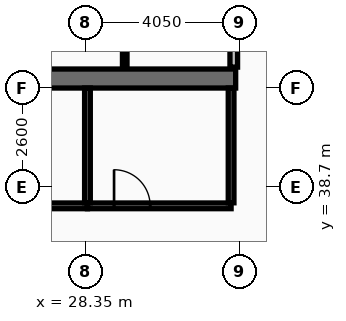
"""IFC4 building model, lengths in metres.
Left out: names, types, materials, properties, quantities, classifications, styles, units other than length and angle.
Written with IfcOpenShell. Run it as: python <this file> out.ifc"""

import sys

from ifc_helpers import new_model, si_unit, direction, frame, frame_2d, origin, place, context, subcontext, project, spatial, rectangle, extrude, element, fill, save


model = new_model("IFC4")
c1 = context("Model", 3, precision=1e-05, world=origin(), true_north=direction((0.0, 1.0)))
c2 = subcontext(c1, "Body", "Model", "MODEL_VIEW")
j1 = project(units=[si_unit("LENGTHUNIT", "METRE"), si_unit("PLANEANGLEUNIT", "RADIAN")], contexts=[c1])
p1 = place(None, origin())
s1 = spatial("IfcSite", under=j1, at=p1, CompositionType="ELEMENT")
p2 = place(p1, origin())
s2 = spatial("IfcBuilding", under=s1, at=p2, CompositionType="ELEMENT")
p3 = place(p2, frame((0.0, 0.0, 314.6)))
s3 = spatial("IfcBuildingStorey", under=s2, at=p3, CompositionType="ELEMENT", Elevation=314.6)
p4 = place(p3, frame((32.3, 41.55, 0.0), z_axis=(0.0, 0.0, 1.0), x_axis=(-1.0, 0.0, 0.0)))
e1 = element("IfcWall", 1, at=p4, inside=s3, PredefinedType="SHEAR", context=c2, shape_type="SweptSolid", body=[
    extrude(rectangle(XDim=11.45, YDim=0.5, at=frame_2d((5.725, 0.0))), origin(), (0.0, 0.0, 1.0), 3.44),
])
p5 = place(p3, frame((32.25, 41.85, 0.0), z_axis=(0.0, 0.0, 1.0), x_axis=(0.0, 1.0, 0.0)))
e2 = element("IfcWall", 2, at=p5, inside=s3, PredefinedType="PARTITIONING", context=c2, shape_type="SweptSolid", body=[
    extrude(rectangle(XDim=2.395, YDim=0.2, at=frame_2d((1.198, 0.0))), origin(), (0.0, 0.0, 1.0), 3.44),
])
p6 = place(p3, frame((29.381, 41.85, 0.0), z_axis=(0.0, 0.0, 1.0), x_axis=(0.0, 1.0, 0.0)))
e3 = element("IfcWall", 3, at=p6, inside=s3, PredefinedType="PARTITIONING", context=c2, shape_type="SweptSolid", body=[
    extrude(rectangle(XDim=2.395, YDim=0.12, at=frame_2d((1.198, 0.0))), origin(), (0.0, 0.0, 1.0), 3.44),
])
p7 = place(p3, frame((24.7, 38.2, 0.0), z_axis=(0.0, 0.0, 1.0), x_axis=(1.0, 0.0, 0.0)))
e4 = element("IfcWall", 4, at=p7, inside=s3, PredefinedType="PARTITIONING", context=c2, shape_type="SweptSolid", body=[
    extrude(rectangle(XDim=3.7, YDim=0.15, at=frame_2d((1.85, 0.0))), origin(), (0.0, 0.0, 1.0), 2.83),
])
p8 = place(p7, frame((0.9, 0.0, 0.0)))
e5 = element("IfcOpeningElement", 5, at=p8, cuts=e4, PredefinedType="OPENING", context=c2, shape_type="SweptSolid", body=[
    extrude(rectangle(XDim=0.95, YDim=2.05, at=frame_2d((0.475, 1.025))), frame((0.0, 0.085, 0.0), z_axis=(0.0, -1.0, 0.0), x_axis=(1.0, 0.0, 0.0)), (0.0, 0.0, 1.0), 0.17),
])
p9 = place(p3, frame((28.4, 38.2, 0.0), z_axis=(0.0, 0.0, 1.0), x_axis=(1.0, 0.0, 0.0)))
e6 = element("IfcWall", 6, at=p9, inside=s3, PredefinedType="PARTITIONING", context=c2, shape_type="SweptSolid", body=[
    extrude(rectangle(XDim=3.78, YDim=0.15, at=frame_2d((1.89, 0.0))), origin(), (0.0, 0.0, 1.0), 3.44),
])
p10 = place(p9, frame((0.7, 0.0, 0.0)))
e7 = element("IfcOpeningElement", 7, at=p10, cuts=e6, PredefinedType="OPENING", context=c2, shape_type="SweptSolid", body=[
    extrude(rectangle(XDim=0.95, YDim=2.05, at=frame_2d((0.475, 1.025))), frame((0.0, 0.085, 0.0), z_axis=(0.0, -1.0, 0.0), x_axis=(1.0, 0.0, 0.0)), (0.0, 0.0, 1.0), 0.17),
])
for number, where, z_axis, x_axis in (
    (8, (28.4, 38.28, 0.0), (0.0, 0.0, 1.0), (0.0, 1.0, 0.0)),
    (9, (32.18, 38.28, 0.0), (0.0, 0.0, 1.0), (0.0, 1.0, 0.0)),
):
    element("IfcWall", number, at=place(p3, frame(where, z_axis=z_axis, x_axis=x_axis)), inside=s3, PredefinedType="PARTITIONING", context=c2, shape_type="SweptSolid", body=[
        extrude(rectangle(XDim=3.02, YDim=0.15, at=frame_2d((1.51, 0.0))), origin(), (0.0, 0.0, 1.0), 3.44),
    ])
p11 = place(p10, origin())
e10 = element("IfcDoor", 10, at=p11, inside=s3, OperationType="SINGLE_SWING_LEFT", PredefinedType="DOOR", context=c2, shape_type="SweptSolid", body=[
    extrude(rectangle(XDim=0.95, YDim=2.05, at=frame_2d((0.475, 1.025))), frame((0.0, 0.025, 0.0), z_axis=(0.0, -1.0, 0.0), x_axis=(1.0, 0.0, 0.0)), (0.0, 0.0, 1.0), 0.05),
])
fill(e7, e10)
save(model, sys.argv[1])
